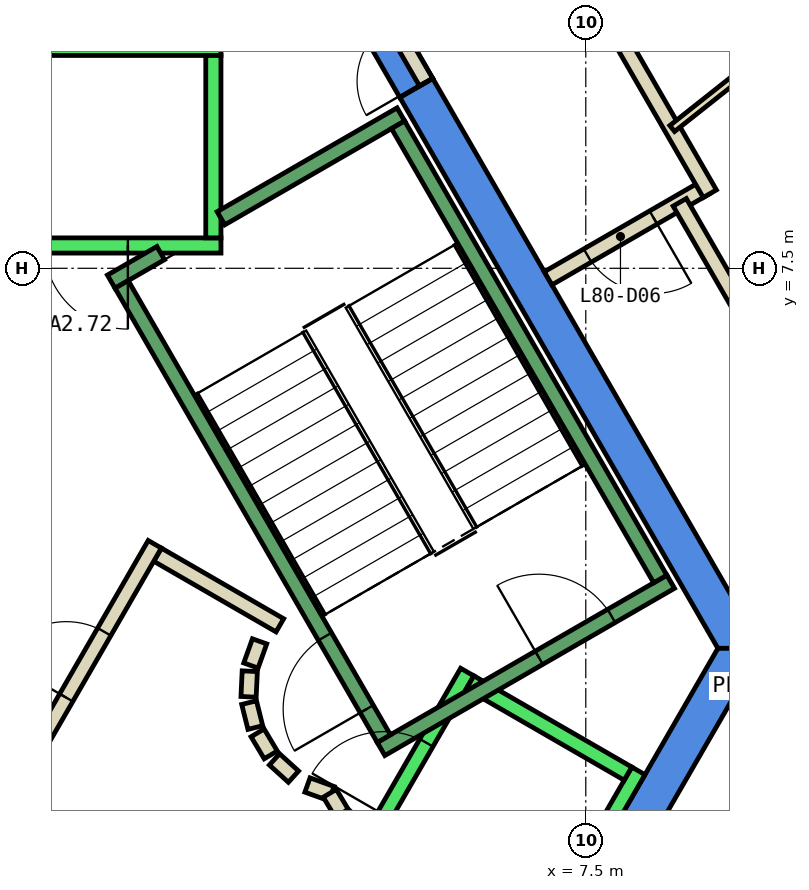
"""IFC4 building model, lengths in metres.
Left out: names, types, materials, properties, quantities, classifications, styles, units other than length and angle.
Written with IfcOpenShell. Run it as: python <this file> out.ifc"""

import sys

from ifc_helpers import new_model, si_unit, direction, frame, frame_2d, origin, place, context, subcontext, project, spatial, polyline, rectangle, outline, extrude, element, fill, save


model = new_model("IFC4")
c1 = context("Model", 3, precision=1e-05, world=origin(), true_north=direction((0.0, 1.0)))
c2 = subcontext(c1, "Body", "Model", "MODEL_VIEW")
j1 = project(units=[si_unit("LENGTHUNIT", "METRE"), si_unit("PLANEANGLEUNIT", "RADIAN")], contexts=[c1])
p1 = place(None, origin())
s1 = spatial("IfcSite", under=j1, at=p1, CompositionType="ELEMENT")
p2 = place(p1, origin())
s2 = spatial("IfcBuilding", under=s1, at=p2, CompositionType="ELEMENT")
p3 = place(p2, frame((0.0, 0.0, 340.4)))
s3 = spatial("IfcBuildingStorey", under=s2, at=p3, CompositionType="ELEMENT", Elevation=340.4)
p4 = place(p3, frame((0.0, 0.0, -0.45)))
e1 = element("IfcWall", 1, at=p4, inside=s3, PredefinedType="SHEAR", context=c2, shape_type="SweptSolid", body=[
    extrude(outline(polyline([(5.486, 9.998), (5.053, 9.748), (9.238, 2.5), (9.815, 2.5), (5.486, 9.998)])), origin(), (0.0, 0.0, 1.0), 4.6),
])
p5 = place(p3, frame((0.0, 0.0, 3.6)))
e2 = element("IfcWall", 2, at=p5, inside=s3, PredefinedType="SHEAR", context=c2, shape_type="SweptSolid", body=[
    extrude(outline(polyline([(5.022, 10.8), (4.677, 10.601), (4.619, 10.5), (5.053, 9.748), (5.486, 9.998), (5.022, 10.8)])), origin(), (0.0, 0.0, 1.0), 0.55),
])
p6 = place(p3, frame((0.0, 0.0, -0.45)))
e3 = element("IfcWall", 3, at=p6, inside=s3, PredefinedType="SHEAR", context=c2, shape_type="SweptSolid", body=[
    extrude(outline(polyline([(4.907, -6.0), (9.815, 2.5), (9.238, 2.5), (4.619, -5.5), (4.907, -6.0)])), origin(), (0.0, 0.0, 1.0), 4.6),
])
p7 = place(p3, frame((12.605, 7.854, 0.0), z_axis=(0.0, 0.0, 1.0), x_axis=(-0.510686403068, 0.859767060152, 0.0)))
e4 = element("IfcWall", 4, at=p7, inside=s3, PredefinedType="STANDARD", context=c2, shape_type="SweptSolid", body=[
    extrude(rectangle(XDim=6.38, YDim=0.3, at=frame_2d((3.19, 0.0))), origin(), (0.0, 0.0, 1.0), 4.15),
])
p8 = place(p7, frame((0.595, 0.0, 0.9)))
e5 = element("IfcOpeningElement", 5, at=p8, cuts=e4, PredefinedType="OPENING", context=c2, shape_type="SweptSolid", body=[
    extrude(rectangle(XDim=2.0, YDim=3.0, at=frame_2d((1.0, 1.5))), frame((0.0, 0.16, 0.0), z_axis=(0.0, -1.0, 0.0), x_axis=(1.0, 0.0, 0.0)), (0.0, 0.0, 1.0), 0.32),
])
p9 = place(p7, frame((3.785, 0.0, 0.9)))
e6 = element("IfcOpeningElement", 6, at=p9, cuts=e4, PredefinedType="OPENING", context=c2, shape_type="SweptSolid", body=[
    extrude(rectangle(XDim=2.0, YDim=3.0, at=frame_2d((1.0, 1.5))), frame((0.0, 0.16, 0.0), z_axis=(0.0, -1.0, 0.0), x_axis=(1.0, 0.0, 0.0)), (0.0, 0.0, 1.0), 0.32),
])
p10 = place(p3, frame((1.866, 3.732, 0.0), z_axis=(0.0, 0.0, 1.0), x_axis=(0.866043361281, -0.499968895414, 0.0)))
e7 = element("IfcWall", 7, at=p10, inside=s3, PredefinedType="PARTITIONING", context=c2, shape_type="SweptSolid", body=[
    extrude(rectangle(XDim=1.858, YDim=0.2, at=frame_2d((0.929, 0.0))), origin(), (0.0, 0.0, 1.0), 4.15),
])
p11 = place(p3, frame((3.208, 2.592, 0.0), z_axis=(0.0, 0.0, 1.0), x_axis=(-0.337388820924, -0.941365382578, 0.0)))
e8 = element("IfcWall", 8, at=p11, inside=s3, PredefinedType="PARTITIONING", context=c2, shape_type="SweptSolid", body=[
    extrude(rectangle(XDim=0.338, YDim=0.2, at=frame_2d((0.169, 0.0))), origin(), (0.0, 0.0, 1.0), 4.15),
])
p12 = place(p3, frame((3.079, 2.199, 0.0), z_axis=(0.0, 0.0, 1.0), x_axis=(-0.047771483479, -0.998858290933, 0.0)))
e9 = element("IfcWall", 9, at=p12, inside=s3, PredefinedType="PARTITIONING", context=c2, shape_type="SweptSolid", body=[
    extrude(rectangle(XDim=0.337, YDim=0.2, at=frame_2d((0.169, 0.0))), origin(), (0.0, 0.0, 1.0), 4.15),
])
p13 = place(p3, frame((3.07, 1.786, 0.0), z_axis=(0.0, 0.0, 1.0), x_axis=(0.242705583207, -0.970099994784, 0.0)))
e10 = element("IfcWall", 10, at=p13, inside=s3, PredefinedType="PARTITIONING", context=c2, shape_type="SweptSolid", body=[
    extrude(rectangle(XDim=0.338, YDim=0.2, at=frame_2d((0.169, 0.0))), origin(), (0.0, 0.0, 1.0), 4.15),
])
for number, where, z_axis, x_axis in (
    (11, (3.182, 1.388, 0.0), (0.0, 0.0, 1.0), (0.512, -0.859, 0.0)),
    (12, (3.404, 1.039, 0.0), (0.0, 0.0, 1.0), (0.74, -0.672, 0.0)),
):
    element("IfcWall", number, at=place(p3, frame(where, z_axis=z_axis, x_axis=x_axis)), inside=s3, PredefinedType="PARTITIONING", context=c2, shape_type="SweptSolid", body=[
        extrude(rectangle(XDim=0.338, YDim=0.2, at=frame_2d((0.169, 0.0))), origin(), (0.0, 0.0, 1.0), 4.15),
    ])
p14 = place(p3, frame((3.838, 0.702, 0.0), z_axis=(0.0, 0.0, 1.0), x_axis=(0.941035081519, -0.338308993895, 0.0)))
e13 = element("IfcWall", 13, at=p14, inside=s3, PredefinedType="PARTITIONING", context=c2, shape_type="SweptSolid", body=[
    extrude(rectangle(XDim=0.337, YDim=0.2, at=frame_2d((0.168, 0.0))), origin(), (0.0, 0.0, 1.0), 4.15),
])
p15 = place(p3, frame((4.132, 0.593, 0.0), z_axis=(0.0, 0.0, 1.0), x_axis=(0.513561617048, -0.858052717201, 0.0)))
e14 = element("IfcWall", 14, at=p15, inside=s3, PredefinedType="PARTITIONING", context=c2, shape_type="SweptSolid", body=[
    extrude(rectangle(XDim=0.308, YDim=0.2, at=frame_2d((0.154, 0.0))), origin(), (0.0, 0.0, 1.0), 4.15),
])
p16 = place(p3, frame((4.301, 0.315, 0.0), z_axis=(0.0, 0.0, 1.0), x_axis=(0.741798017506, -0.670623367639, 0.0)))
e15 = element("IfcWall", 15, at=p16, inside=s3, PredefinedType="PARTITIONING", context=c2, shape_type="SweptSolid", body=[
    extrude(rectangle(XDim=0.309, YDim=0.2, at=frame_2d((0.154, 0.0))), origin(), (0.0, 0.0, 1.0), 4.15),
])
p17 = place(p3, frame((0.05, 0.787, 0.0), z_axis=(0.0, 0.0, 1.0), x_axis=(0.499954076797, 0.866051915934, 0.0)))
e16 = element("IfcWall", 16, at=p17, inside=s3, PredefinedType="PARTITIONING", context=c2, shape_type="SweptSolid", body=[
    extrude(rectangle(XDim=3.558, YDim=0.2, at=frame_2d((1.779, 0.0))), origin(), (0.0, 0.0, 1.0), 4.15),
])
p18 = place(p17, frame((1.229, 0.0, 0.0)))
e17 = element("IfcOpeningElement", 17, at=p18, cuts=e16, PredefinedType="OPENING", context=c2, shape_type="SweptSolid", body=[
    extrude(rectangle(XDim=1.0, YDim=2.1, at=frame_2d((0.5, 1.05))), frame((0.0, 0.11, 0.0), z_axis=(0.0, -1.0, 0.0), x_axis=(1.0, 0.0, 0.0)), (0.0, 0.0, 1.0), 0.22),
])
p19 = place(p3, frame((9.082, 8.568, 0.0), z_axis=(0.0, 0.0, 1.0), x_axis=(-0.865955154139, -0.50012165622, 0.0)))
e18 = element("IfcWall", 18, at=p19, inside=s3, PredefinedType="PARTITIONING", context=c2, shape_type="SweptSolid", body=[
    extrude(rectangle(XDim=2.4, YDim=0.2, at=frame_2d((1.2, 0.0))), origin(), (0.0, 0.0, 1.0), 4.15),
])
p20 = place(p19, frame((0.8, 0.0, 0.0)))
e19 = element("IfcOpeningElement", 19, at=p20, cuts=e18, PredefinedType="OPENING", context=c2, shape_type="SweptSolid", body=[
    extrude(rectangle(XDim=1.0, YDim=2.1, at=frame_2d((0.5, 1.05))), frame((0.0, 0.11, 0.0), z_axis=(0.0, -1.0, 0.0), x_axis=(1.0, 0.0, 0.0)), (0.0, 0.0, 1.0), 0.22),
])
p21 = place(p3, frame((5.532, 14.717, 0.0), z_axis=(0.0, 0.0, 1.0), x_axis=(0.499968011863, -0.866043871356, 0.0)))
e20 = element("IfcWall", 20, at=p21, inside=s3, PredefinedType="PARTITIONING", context=c2, shape_type="SweptSolid", body=[
    extrude(rectangle(XDim=7.201, YDim=0.2, at=frame_2d((3.6, 0.0))), origin(), (0.0, 0.0, 1.0), 4.15),
])
p22 = place(p21, frame((3.18, 0.0, 0.0)))
e21 = element("IfcOpeningElement", 21, at=p22, cuts=e20, PredefinedType="OPENING", context=c2, shape_type="SweptSolid", body=[
    extrude(rectangle(XDim=1.0, YDim=2.1, at=frame_2d((0.5, 1.05))), frame((0.0, 0.11, 0.0), z_axis=(0.0, -1.0, 0.0), x_axis=(1.0, 0.0, 0.0)), (0.0, 0.0, 1.0), 0.22),
])
p23 = place(p3, frame((8.736, 8.368, 0.0), z_axis=(0.0, 0.0, 1.0), x_axis=(0.499995994493, -0.866027716353, 0.0)))
e22 = element("IfcWall", 22, at=p23, inside=s3, PredefinedType="PARTITIONING", context=c2, shape_type="SweptSolid", body=[
    extrude(rectangle(XDim=6.876, YDim=0.2, at=frame_2d((3.438, 0.0))), origin(), (0.0, 0.0, 1.0), 4.15),
])
p24 = place(p23, frame((5.726, 0.0, 0.0)))
e23 = element("IfcOpeningElement", 23, at=p24, cuts=e22, PredefinedType="OPENING", context=c2, shape_type="SweptSolid", body=[
    extrude(rectangle(XDim=1.0, YDim=2.1, at=frame_2d((0.5, 1.05))), frame((0.0, 0.11, 0.0), z_axis=(0.0, -1.0, 0.0), x_axis=(1.0, 0.0, 0.0)), (0.0, 0.0, 1.0), 0.22),
])
p25 = place(p3, frame((12.074, 2.413, 0.0), z_axis=(0.0, 0.0, 1.0), x_axis=(-0.499974029402, -0.866040397397, 0.0)))
e24 = element("IfcWall", 24, at=p25, inside=s3, PredefinedType="PARTITIONING", context=c2, shape_type="SweptSolid", body=[
    extrude(rectangle(XDim=5.936, YDim=0.2, at=frame_2d((2.968, 0.0))), origin(), (0.0, 0.0, 1.0), 4.15),
])
p26 = place(p3, frame((10.617, 10.906, 0.0), z_axis=(0.0, 0.0, 1.0), x_axis=(-0.784159528351, -0.620559291363, 0.0)))
e25 = element("IfcWall", 25, at=p26, inside=s3, PredefinedType="PARTITIONING", context=c2, shape_type="SweptSolid", body=[
    extrude(rectangle(XDim=2.525, YDim=0.1, at=frame_2d((1.262, 0.0))), origin(), (0.0, 0.0, 1.0), 4.15),
])
p27 = place(p3, frame((5.399, 9.948, 0.0), z_axis=(0.0, 0.0, 1.0), x_axis=(-0.499882215713, 0.866093395895, 0.0)))
e26 = element("IfcWall", 26, at=p27, inside=s3, PredefinedType="PARTITIONING", context=c2, shape_type="SweptSolid", body=[
    extrude(rectangle(XDim=0.926, YDim=0.2, at=frame_2d((0.463, 0.0))), origin(), (0.0, 0.0, 1.0), 2.4),
])
p28 = place(p27, frame((0.017, 0.0, 0.0)))
e27 = element("IfcOpeningElement", 27, at=p28, cuts=e26, PredefinedType="OPENING", context=c2, shape_type="SweptSolid", body=[
    extrude(rectangle(XDim=0.9, YDim=2.1, at=frame_2d((0.45, 1.05))), frame((0.0, 0.11, 0.0), z_axis=(0.0, -1.0, 0.0), x_axis=(1.0, 0.0, 0.0)), (0.0, 0.0, 1.0), 0.22),
])
p29 = place(p3, frame((2.7, 7.8, 0.0), z_axis=(0.0, 0.0, 1.0), x_axis=(-1.0, 0.0, 0.0)))
e28 = element("IfcWall", 28, at=p29, inside=s3, PredefinedType="STANDARD", context=c2, shape_type="SweptSolid", body=[
    extrude(rectangle(XDim=5.4, YDim=0.2, at=frame_2d((2.7, 0.0))), origin(), (0.0, 0.0, 1.0), 4.15),
])
p30 = place(p29, frame((1.225, 0.0, 0.0)))
e29 = element("IfcOpeningElement", 29, at=p30, cuts=e28, PredefinedType="OPENING", context=c2, shape_type="SweptSolid", body=[
    extrude(rectangle(XDim=1.1, YDim=2.1, at=frame_2d((0.55, 1.05))), frame((0.0, 0.11, 0.0), z_axis=(0.0, -1.0, 0.0), x_axis=(1.0, 0.0, 0.0)), (0.0, 0.0, 1.0), 0.22),
])
p31 = place(p29, frame((3.075, 0.0, 0.0)))
e30 = element("IfcOpeningElement", 30, at=p31, cuts=e28, PredefinedType="OPENING", context=c2, shape_type="SweptSolid", body=[
    extrude(rectangle(XDim=1.1, YDim=2.1, at=frame_2d((0.55, 1.05))), frame((0.0, 0.11, 0.0), z_axis=(0.0, -1.0, 0.0), x_axis=(1.0, 0.0, 0.0)), (0.0, 0.0, 1.0), 0.22),
])
p32 = place(p3, frame((2.7, 10.4, 0.0), z_axis=(0.0, 0.0, 1.0), x_axis=(-1.0, 0.0, 0.0)))
e31 = element("IfcWall", 31, at=p32, inside=s3, PredefinedType="STANDARD", context=c2, shape_type="SweptSolid", body=[
    extrude(rectangle(XDim=5.4, YDim=0.2, at=frame_2d((2.7, 0.0))), origin(), (0.0, 0.0, 1.0), 4.15),
])
p33 = place(p3, frame((2.6, 7.9, 0.0), z_axis=(0.0, 0.0, 1.0), x_axis=(0.0, 1.0, 0.0)))
e32 = element("IfcWall", 32, at=p33, inside=s3, PredefinedType="STANDARD", context=c2, shape_type="SweptSolid", body=[
    extrude(rectangle(XDim=2.4, YDim=0.2, at=frame_2d((1.2, 0.0))), origin(), (0.0, 0.0, 1.0), 4.15),
])
p34 = place(p3, frame((3.24, -2.488, 0.0), z_axis=(0.0, 0.0, 1.0), x_axis=(0.500034260056, 0.866005622828, 0.0)))
e33 = element("IfcWall", 33, at=p34, inside=s3, PredefinedType="STANDARD", context=c2, shape_type="SweptSolid", body=[
    extrude(rectangle(XDim=5.399, YDim=0.2, at=frame_2d((2.7, 0.0))), origin(), (0.0, 0.0, 1.0), 4.15),
])
p35 = place(p34, frame((3.225, 0.0, 0.0)))
e34 = element("IfcOpeningElement", 34, at=p35, cuts=e33, PredefinedType="OPENING", context=c2, shape_type="SweptSolid", body=[
    extrude(rectangle(XDim=1.1, YDim=2.1, at=frame_2d((0.55, 1.05))), frame((0.0, 0.11, 0.0), z_axis=(0.0, -1.0, 0.0), x_axis=(1.0, 0.0, 0.0)), (0.0, 0.0, 1.0), 0.22),
])
p36 = place(p34, frame((1.225, 0.0, 0.0)))
e35 = element("IfcOpeningElement", 35, at=p36, cuts=e33, PredefinedType="OPENING", context=c2, shape_type="SweptSolid", body=[
    extrude(rectangle(XDim=1.1, YDim=2.1, at=frame_2d((0.55, 1.05))), frame((0.0, 0.11, 0.0), z_axis=(0.0, -1.0, 0.0), x_axis=(1.0, 0.0, 0.0)), (0.0, 0.0, 1.0), 0.22),
])
p37 = place(p3, frame((5.492, -3.788, 0.0), z_axis=(0.0, 0.0, 1.0), x_axis=(0.500034260056, 0.866005622828, 0.0)))
e36 = element("IfcWall", 36, at=p37, inside=s3, PredefinedType="STANDARD", context=c2, shape_type="SweptSolid", body=[
    extrude(rectangle(XDim=5.399, YDim=0.2, at=frame_2d((2.7, 0.0))), origin(), (0.0, 0.0, 1.0), 4.15),
])
p38 = place(p3, frame((5.977, 2.052, 0.0), z_axis=(0.0, 0.0, 1.0), x_axis=(0.865973769406, -0.500089422704, 0.0)))
e37 = element("IfcWall", 37, at=p38, inside=s3, PredefinedType="STANDARD", context=c2, shape_type="SweptSolid", body=[
    extrude(rectangle(XDim=2.399, YDim=0.2, at=frame_2d((1.2, 0.0))), origin(), (0.0, 0.0, 1.0), 4.15),
])
p39 = place(p3, frame((4.806, 1.176, 0.0), z_axis=(0.0, 0.0, 1.0), x_axis=(0.866059941101, 0.499940174841, 0.0)))
e38 = element("IfcWall", 38, at=p39, inside=s3, PredefinedType="STANDARD", context=c2, shape_type="SweptSolid", body=[
    extrude(rectangle(XDim=4.4, YDim=0.2, at=frame_2d((2.2, 0.0))), origin(), (0.0, 0.0, 1.0), 4.15),
])
p40 = place(p39, frame((2.4, 0.0, 0.0)))
e39 = element("IfcOpeningElement", 39, at=p40, cuts=e38, PredefinedType="OPENING", context=c2, shape_type="SweptSolid", body=[
    extrude(rectangle(XDim=1.1, YDim=2.2, at=frame_2d((0.55, 1.1))), frame((0.0, 0.11, 0.0), z_axis=(0.0, -1.0, 0.0), x_axis=(1.0, 0.0, 0.0)), (0.0, 0.0, 1.0), 0.22),
])
p41 = place(p3, frame((2.7, 8.158, 0.0), z_axis=(0.0, 0.0, 1.0), x_axis=(0.86611865017, 0.499838457731, 0.0)))
e40 = element("IfcWall", 40, at=p41, inside=s3, PredefinedType="STANDARD", context=c2, shape_type="SweptSolid", body=[
    extrude(rectangle(XDim=2.733, YDim=0.2, at=frame_2d((1.366, 0.0))), origin(), (0.0, 0.0, 1.0), 4.15),
])
p42 = place(p3, frame((1.256, 7.324, 0.0), z_axis=(0.0, 0.0, 1.0), x_axis=(0.865915093549, 0.500191014278, 0.0)))
e41 = element("IfcWall", 41, at=p42, inside=s3, PredefinedType="STANDARD", context=c2, shape_type="SweptSolid", body=[
    extrude(rectangle(XDim=0.752, YDim=0.2, at=frame_2d((0.376, 0.0))), origin(), (0.0, 0.0, 1.0), 4.15),
])
p43 = place(p3, frame((4.843, 1.312, 0.0), z_axis=(0.0, 0.0, 1.0), x_axis=(-0.499963383562, 0.866046543262, 0.0)))
e42 = element("IfcWall", 42, at=p43, inside=s3, PredefinedType="STANDARD", context=c2, shape_type="SweptSolid", body=[
    extrude(rectangle(XDim=6.9, YDim=0.2, at=frame_2d((3.45, 0.0))), origin(), (0.0, 0.0, 1.0), 4.15),
])
p44 = place(p43, frame((0.45, 0.0, 0.0)))
e43 = element("IfcOpeningElement", 43, at=p44, cuts=e42, PredefinedType="OPENING", context=c2, shape_type="SweptSolid", body=[
    extrude(rectangle(XDim=1.1, YDim=2.2, at=frame_2d((0.55, 1.1))), frame((0.0, 0.11, 0.0), z_axis=(0.0, -1.0, 0.0), x_axis=(1.0, 0.0, 0.0)), (0.0, 0.0, 1.0), 0.22),
])
p45 = place(p3, frame((8.48, 3.412, 0.0), z_axis=(0.0, 0.0, 1.0), x_axis=(-0.499978703459, 0.866037698999, 0.0)))
e44 = element("IfcWall", 44, at=p45, inside=s3, PredefinedType="STANDARD", context=c2, shape_type="SweptSolid", body=[
    extrude(rectangle(XDim=6.9, YDim=0.2, at=frame_2d((3.45, 0.0))), origin(), (0.0, 0.0, 1.0), 4.15),
])
p46 = place(p20, origin())
e45 = element("IfcDoor", 45, at=p46, inside=s3, OperationType="SINGLE_SWING_LEFT", PredefinedType="DOOR", context=c2, shape_type="SweptSolid", body=[
    extrude(rectangle(XDim=1.0, YDim=2.1, at=frame_2d((0.5, 1.05))), frame((0.0, 0.025, 0.0), z_axis=(0.0, -1.0, 0.0), x_axis=(1.0, 0.0, 0.0)), (0.0, 0.0, 1.0), 0.05),
])
fill(e19, e45)
p47 = place(p18, origin())
e46 = element("IfcDoor", 46, at=p47, inside=s3, OperationType="SINGLE_SWING_RIGHT", PredefinedType="DOOR", context=c2, shape_type="SweptSolid", body=[
    extrude(rectangle(XDim=1.0, YDim=2.1, at=frame_2d((0.5, 1.05))), frame((0.0, 0.025, 0.0), z_axis=(0.0, -1.0, 0.0), x_axis=(1.0, 0.0, 0.0)), (0.0, 0.0, 1.0), 0.05),
])
fill(e17, e46)
p48 = place(p28, origin())
e47 = element("IfcDoor", 47, at=p48, inside=s3, OperationType="SINGLE_SWING_LEFT", PredefinedType="DOOR", context=c2, shape_type="SweptSolid", body=[
    extrude(rectangle(XDim=0.9, YDim=2.1, at=frame_2d((0.45, 1.05))), frame((0.0, 0.025, 0.0), z_axis=(0.0, -1.0, 0.0), x_axis=(1.0, 0.0, 0.0)), (0.0, 0.0, 1.0), 0.05),
])
fill(e27, e47)
p49 = place(p30, origin())
e48 = element("IfcDoor", 48, at=p49, inside=s3, OperationType="SLIDING_TO_LEFT", PredefinedType="DOOR", context=c2, shape_type="SweptSolid", body=[
    extrude(rectangle(XDim=1.1, YDim=2.1, at=frame_2d((0.55, 1.05))), frame((0.0, 0.025, 0.0), z_axis=(0.0, -1.0, 0.0), x_axis=(1.0, 0.0, 0.0)), (0.0, 0.0, 1.0), 0.05),
])
fill(e29, e48)
p50 = place(p35, origin())
e49 = element("IfcDoor", 49, at=p50, inside=s3, OperationType="SLIDING_TO_LEFT", PredefinedType="DOOR", context=c2, shape_type="SweptSolid", body=[
    extrude(rectangle(XDim=1.1, YDim=2.1, at=frame_2d((0.55, 1.05))), frame((0.0, 0.025, 0.0), z_axis=(0.0, -1.0, 0.0), x_axis=(1.0, 0.0, 0.0)), (0.0, 0.0, 1.0), 0.05),
])
fill(e34, e49)
p51 = place(p44, origin())
e50 = element("IfcDoor", 50, at=p51, inside=s3, OperationType="SINGLE_SWING_LEFT", PredefinedType="DOOR", context=c2, shape_type="SweptSolid", body=[
    extrude(rectangle(XDim=1.1, YDim=2.2, at=frame_2d((0.55, 1.1))), frame((0.0, 0.025, 0.0), z_axis=(0.0, -1.0, 0.0), x_axis=(1.0, 0.0, 0.0)), (0.0, 0.0, 1.0), 0.05),
])
fill(e43, e50)
p52 = place(p40, origin())
e51 = element("IfcDoor", 51, at=p52, inside=s3, OperationType="SINGLE_SWING_LEFT", PredefinedType="DOOR", context=c2, shape_type="SweptSolid", body=[
    extrude(rectangle(XDim=1.1, YDim=2.2, at=frame_2d((0.55, 1.1))), frame((0.0, 0.025, 0.0), z_axis=(0.0, -1.0, 0.0), x_axis=(1.0, 0.0, 0.0)), (0.0, 0.0, 1.0), 0.05),
])
fill(e39, e51)
save(model, sys.argv[1])
